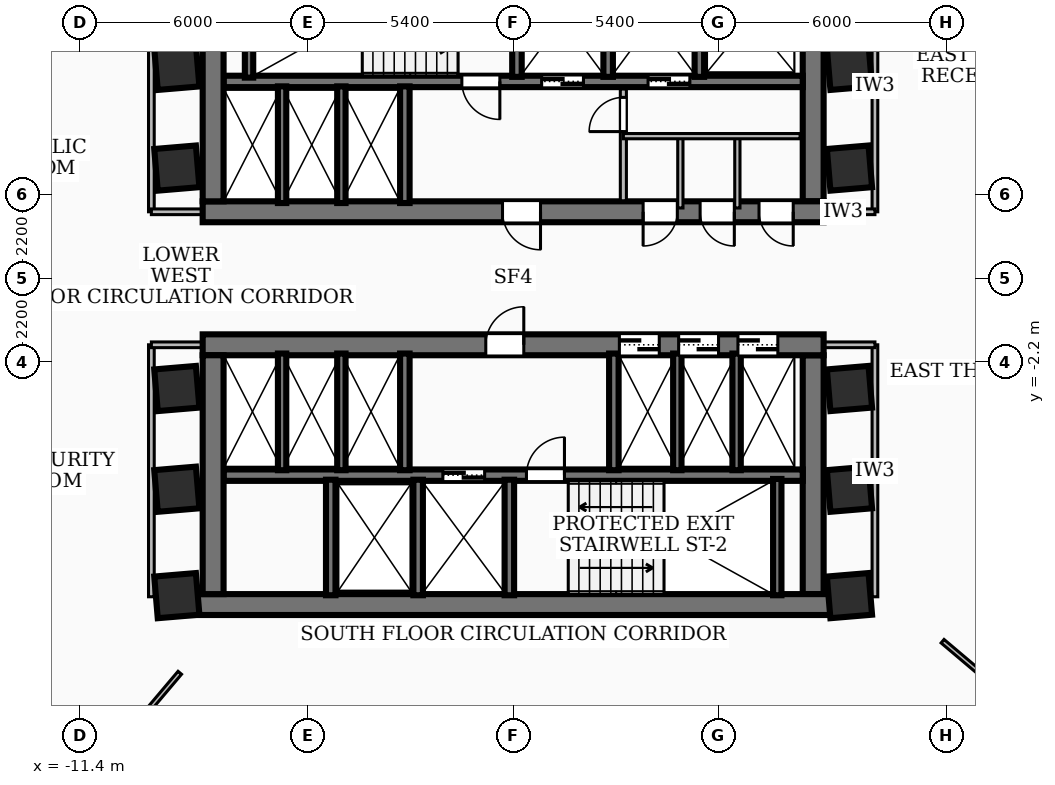
"""IFC4 building model, lengths in metres.
Left out: names, types, materials, properties, quantities, classifications, styles, units other than length and angle.
Written with IfcOpenShell. Run it as: python <this file> out.ifc"""

import sys

from ifc_helpers import new_model, si_unit, direction, frame, frame_2d, origin, origin_2d, place, context, subcontext, project, spatial, rectangle, extrude, element, fill, save


model = new_model("IFC4")
c1 = context("Model", 3, precision=1e-05, world=origin(), true_north=direction((0.0, 1.0)))
c2 = subcontext(c1, "Body", "Model", "MODEL_VIEW")
j1 = project(units=[si_unit("LENGTHUNIT", "METRE"), si_unit("PLANEANGLEUNIT", "RADIAN")], contexts=[c1])
p1 = place(None, origin())
s1 = spatial("IfcSite", under=j1, at=p1, CompositionType="ELEMENT")
p2 = place(p1, origin())
s2 = spatial("IfcBuilding", under=s1, at=p2, CompositionType="ELEMENT")
p3 = place(p2, frame((0.0, 0.0, 64.08)))
s3 = spatial("IfcBuildingStorey", under=s2, at=p3, CompositionType="ELEMENT", Elevation=64.08)
p4 = place(p3, frame((8.17, 1.75, 0.0), z_axis=(0.0, 0.0, 1.0), x_axis=(-1.0, 0.0, 0.0)))
e1 = element("IfcWall", 1, at=p4, inside=s3, PredefinedType="SHEAR", context=c2, shape_type="SweptSolid", body=[
    extrude(rectangle(XDim=16.34, YDim=0.55, at=frame_2d((8.17, 0.0))), origin(), (0.0, 0.0, 1.0), 3.34),
])
p5 = place(p4, frame((7.45, 0.0, 0.0)))
e2 = element("IfcOpeningElement", 2, at=p5, cuts=e1, PredefinedType="OPENING", context=c2, shape_type="SweptSolid", body=[
    extrude(rectangle(XDim=1.0, YDim=2.1, at=frame_2d((0.5, 1.05))), frame((0.0, 0.285, 0.0), z_axis=(0.0, -1.0, 0.0), x_axis=(1.0, 0.0, 0.0)), (0.0, 0.0, 1.0), 0.57),
])
p6 = place(p4, frame((3.85, 0.0, 0.0)))
e3 = element("IfcOpeningElement", 3, at=p6, cuts=e1, PredefinedType="OPENING", context=c2, shape_type="SweptSolid", body=[
    extrude(rectangle(XDim=0.9, YDim=2.06, at=frame_2d((0.45, 1.03))), frame((0.0, 0.285, 0.0), z_axis=(0.0, -1.0, 0.0), x_axis=(1.0, 0.0, 0.0)), (0.0, 0.0, 1.0), 0.57),
])
p7 = place(p4, frame((2.35, 0.0, 0.0)))
e4 = element("IfcOpeningElement", 4, at=p7, cuts=e1, PredefinedType="OPENING", context=c2, shape_type="SweptSolid", body=[
    extrude(rectangle(XDim=0.9, YDim=2.06, at=frame_2d((0.45, 1.03))), frame((0.0, 0.285, 0.0), z_axis=(0.0, -1.0, 0.0), x_axis=(1.0, 0.0, 0.0)), (0.0, 0.0, 1.0), 0.57),
])
p8 = place(p4, frame((0.8, 0.0, 0.0)))
e5 = element("IfcOpeningElement", 5, at=p8, cuts=e1, PredefinedType="OPENING", context=c2, shape_type="SweptSolid", body=[
    extrude(rectangle(XDim=0.9, YDim=2.06, at=frame_2d((0.45, 1.03))), frame((0.0, 0.285, 0.0), z_axis=(0.0, -1.0, 0.0), x_axis=(1.0, 0.0, 0.0)), (0.0, 0.0, 1.0), 0.57),
])
for number, where, z_axis, x_axis in (
    (6, (-7.895, 2.025, 0.0), (0.0, 0.0, 1.0), (0.0, 1.0, 0.0)),
    (7, (7.895, 8.31, 0.0), (0.0, 0.0, 1.0), (0.0, -1.0, 0.0)),
):
    element("IfcWall", number, at=place(p3, frame(where, z_axis=z_axis, x_axis=x_axis)), inside=s3, PredefinedType="SHEAR", context=c2, shape_type="SweptSolid", body=[
        extrude(rectangle(XDim=6.285, YDim=0.55, at=frame_2d((3.143, 0.0))), origin(), (0.0, 0.0, 1.0), 3.34),
    ])
p9 = place(p3, frame((7.62, 5.18, 0.0), z_axis=(0.0, 0.0, 1.0), x_axis=(-1.0, 0.0, 0.0)))
e8 = element("IfcWall", 8, at=p9, inside=s3, PredefinedType="SOLIDWALL", context=c2, shape_type="SweptSolid", body=[
    extrude(rectangle(XDim=15.24, YDim=0.3, at=frame_2d((7.62, 0.0))), origin(), (0.0, 0.0, 1.0), 3.34),
])
p10 = place(p9, frame((5.77, 0.0, 0.0)))
e9 = element("IfcOpeningElement", 9, at=p10, cuts=e8, PredefinedType="OPENING", context=c2, shape_type="SweptSolid", body=[
    extrude(rectangle(XDim=1.1, YDim=2.15, at=frame_2d((0.55, 1.075))), frame((0.0, 0.16, 0.0), z_axis=(0.0, -1.0, 0.0), x_axis=(1.0, 0.0, 0.0)), (0.0, 0.0, 1.0), 0.32),
])
p11 = place(p9, frame((2.97, 0.0, 0.0)))
e10 = element("IfcOpeningElement", 10, at=p11, cuts=e8, PredefinedType="OPENING", context=c2, shape_type="SweptSolid", body=[
    extrude(rectangle(XDim=1.1, YDim=2.15, at=frame_2d((0.55, 1.075))), frame((0.0, 0.16, 0.0), z_axis=(0.0, -1.0, 0.0), x_axis=(1.0, 0.0, 0.0)), (0.0, 0.0, 1.0), 0.32),
])
p12 = place(p9, frame((7.97, 0.0, 0.0)))
e11 = element("IfcOpeningElement", 11, at=p12, cuts=e8, PredefinedType="OPENING", context=c2, shape_type="SweptSolid", body=[
    extrude(rectangle(XDim=1.0, YDim=2.1, at=frame_2d((0.5, 1.05))), frame((0.0, 0.16, 0.0), z_axis=(0.0, -1.0, 0.0), x_axis=(1.0, 0.0, 0.0)), (0.0, 0.0, 1.0), 0.32),
])
p13 = place(p3, frame((8.78, -8.585, 0.0), z_axis=(0.0, 0.0, 1.0), x_axis=(-1.0, 0.0, 0.0)))
e12 = element("IfcWall", 12, at=p13, inside=s3, PredefinedType="SHEAR", context=c2, shape_type="SweptSolid", body=[
    extrude(rectangle(XDim=17.56, YDim=0.55, at=frame_2d((8.78, 0.0))), origin(), (0.0, 0.0, 1.0), 3.34),
])
p14 = place(p3, frame((-8.17, -1.75, 0.0), z_axis=(0.0, 0.0, 1.0), x_axis=(1.0, 0.0, 0.0)))
e13 = element("IfcWall", 13, at=p14, inside=s3, PredefinedType="SHEAR", context=c2, shape_type="SweptSolid", body=[
    extrude(rectangle(XDim=16.34, YDim=0.55, at=frame_2d((8.17, 0.0))), origin(), (0.0, 0.0, 1.0), 3.34),
])
p15 = place(p14, frame((7.45, 0.0, 0.0)))
e14 = element("IfcOpeningElement", 14, at=p15, cuts=e13, PredefinedType="OPENING", context=c2, shape_type="SweptSolid", body=[
    extrude(rectangle(XDim=1.0, YDim=2.1, at=frame_2d((0.5, 1.05))), frame((0.0, 0.285, 0.0), z_axis=(0.0, -1.0, 0.0), x_axis=(1.0, 0.0, 0.0)), (0.0, 0.0, 1.0), 0.57),
])
p16 = place(p14, frame((10.965, 0.0, 0.0)))
e15 = element("IfcOpeningElement", 15, at=p16, cuts=e13, PredefinedType="OPENING", context=c2, shape_type="SweptSolid", body=[
    extrude(rectangle(XDim=1.05, YDim=2.15, at=frame_2d((0.525, 1.075))), frame((0.0, 0.285, 0.0), z_axis=(0.0, -1.0, 0.0), x_axis=(1.0, 0.0, 0.0)), (0.0, 0.0, 1.0), 0.57),
])
p17 = place(p14, frame((12.525, 0.0, 0.0)))
e16 = element("IfcOpeningElement", 16, at=p17, cuts=e13, PredefinedType="OPENING", context=c2, shape_type="SweptSolid", body=[
    extrude(rectangle(XDim=1.05, YDim=2.15, at=frame_2d((0.525, 1.075))), frame((0.0, 0.285, 0.0), z_axis=(0.0, -1.0, 0.0), x_axis=(1.0, 0.0, 0.0)), (0.0, 0.0, 1.0), 0.57),
])
p18 = place(p14, frame((14.085, 0.0, 0.0)))
e17 = element("IfcOpeningElement", 17, at=p18, cuts=e13, PredefinedType="OPENING", context=c2, shape_type="SweptSolid", body=[
    extrude(rectangle(XDim=1.05, YDim=2.15, at=frame_2d((0.525, 1.075))), frame((0.0, 0.285, 0.0), z_axis=(0.0, -1.0, 0.0), x_axis=(1.0, 0.0, 0.0)), (0.0, 0.0, 1.0), 0.57),
])
for number, where, z_axis, x_axis in (
    (18, (-7.895, -8.31, 0.0), (0.0, 0.0, 1.0), (0.0, 1.0, 0.0)),
    (19, (7.895, -2.025, 0.0), (0.0, 0.0, 1.0), (0.0, -1.0, 0.0)),
):
    element("IfcWall", number, at=place(p3, frame(where, z_axis=z_axis, x_axis=x_axis)), inside=s3, PredefinedType="SHEAR", context=c2, shape_type="SweptSolid", body=[
        extrude(rectangle(XDim=6.285, YDim=0.55, at=frame_2d((3.143, 0.0))), origin(), (0.0, 0.0, 1.0), 3.34),
    ])
p19 = place(p3, frame((-7.62, -5.18, 0.0), z_axis=(0.0, 0.0, 1.0), x_axis=(1.0, 0.0, 0.0)))
e20 = element("IfcWall", 20, at=p19, inside=s3, PredefinedType="SOLIDWALL", context=c2, shape_type="SweptSolid", body=[
    extrude(rectangle(XDim=15.24, YDim=0.3, at=frame_2d((7.62, 0.0))), origin(), (0.0, 0.0, 1.0), 3.34),
])
p20 = place(p19, frame((5.77, 0.0, 0.0)))
e21 = element("IfcOpeningElement", 21, at=p20, cuts=e20, PredefinedType="OPENING", context=c2, shape_type="SweptSolid", body=[
    extrude(rectangle(XDim=1.1, YDim=2.15, at=frame_2d((0.55, 1.075))), frame((0.0, 0.16, 0.0), z_axis=(0.0, -1.0, 0.0), x_axis=(1.0, 0.0, 0.0)), (0.0, 0.0, 1.0), 0.32),
])
p21 = place(p19, frame((7.97, 0.0, 0.0)))
e22 = element("IfcOpeningElement", 22, at=p21, cuts=e20, PredefinedType="OPENING", context=c2, shape_type="SweptSolid", body=[
    extrude(rectangle(XDim=1.0, YDim=2.1, at=frame_2d((0.5, 1.05))), frame((0.0, 0.16, 0.0), z_axis=(0.0, -1.0, 0.0), x_axis=(1.0, 0.0, 0.0)), (0.0, 0.0, 1.0), 0.32),
])
for number, where, z_axis, x_axis in (
    (23, (-6.95, 5.28, 0.0), (0.0, 0.0, 1.0), (0.0, 1.0, 0.0)),
    (24, (6.95, -8.34, 0.0), (0.0, 0.0, 1.0), (0.0, 1.0, 0.0)),
):
    element("IfcWall", number, at=place(p3, frame(where, z_axis=z_axis, x_axis=x_axis)), inside=s3, PredefinedType="SOLIDWALL", context=c2, shape_type="SweptSolid", body=[
        extrude(rectangle(XDim=3.06, YDim=0.22, at=frame_2d((1.53, 0.0))), origin(), (0.0, 0.0, 1.0), 3.34),
    ])
for number, where, z_axis, x_axis in (
    (25, (0.1, 5.3, 0.0), (0.0, 0.0, 1.0), (0.0, 1.0, 0.0)),
    (26, (2.5, 5.3, 0.0), (0.0, 0.0, 1.0), (0.0, 1.0, 0.0)),
    (27, (4.9, 5.3, 0.0), (0.0, 0.0, 1.0), (0.0, 1.0, 0.0)),
):
    element("IfcWall", number, at=place(p3, frame(where, z_axis=z_axis, x_axis=x_axis)), inside=s3, PredefinedType="SOLIDWALL", context=c2, shape_type="SweptSolid", body=[
        extrude(rectangle(XDim=3.04, YDim=0.25, at=frame_2d((1.52, 0.0))), origin(), (0.0, 0.0, 1.0), 3.34),
    ])
p22 = place(p3, frame((-2.85, 1.98, 0.0), z_axis=(0.0, 0.0, 1.0), x_axis=(0.0, 1.0, 0.0)))
e28 = element("IfcWall", 28, at=p22, inside=s3, PredefinedType="SOLIDWALL", context=c2, shape_type="SweptSolid", body=[
    extrude(rectangle(XDim=3.07, YDim=0.25, at=frame_2d((1.535, 0.0))), origin(), (0.0, 0.0, 1.0), 3.34),
])
for number, where, z_axis, x_axis in (
    (29, (-0.1, -8.34, 0.0), (0.0, 0.0, 1.0), (0.0, 1.0, 0.0)),
    (30, (-2.5, -8.34, 0.0), (0.0, 0.0, 1.0), (0.0, 1.0, 0.0)),
    (31, (-4.8, -8.34, 0.0), (0.0, 0.0, 1.0), (0.0, 1.0, 0.0)),
):
    element("IfcWall", number, at=place(p3, frame(where, z_axis=z_axis, x_axis=x_axis)), inside=s3, PredefinedType="SOLIDWALL", context=c2, shape_type="SweptSolid", body=[
        extrude(rectangle(XDim=3.04, YDim=0.25, at=frame_2d((1.52, 0.0))), origin(), (0.0, 0.0, 1.0), 3.34),
    ])
for number, where, z_axis, x_axis in (
    (32, (-2.85, -5.05, 0.0), (0.0, 0.0, 1.0), (0.0, 1.0, 0.0)),
    (33, (2.65, -5.05, 0.0), (0.0, 0.0, 1.0), (0.0, 1.0, 0.0)),
):
    element("IfcWall", number, at=place(p3, frame(where, z_axis=z_axis, x_axis=x_axis)), inside=s3, PredefinedType="SOLIDWALL", context=c2, shape_type="SweptSolid", body=[
        extrude(rectangle(XDim=3.07, YDim=0.25, at=frame_2d((1.535, 0.0))), origin(), (0.0, 0.0, 1.0), 3.34),
    ])
for number, where, z_axis, x_axis in (
    (34, (-6.08, 1.98, 0.0), (0.0, 0.0, 1.0), (0.0, 1.0, 0.0)),
    (35, (-4.52, 1.98, 0.0), (0.0, 0.0, 1.0), (0.0, 1.0, 0.0)),
    (36, (4.32, -5.05, 0.0), (0.0, 0.0, 1.0), (0.0, 1.0, 0.0)),
    (37, (5.88, -5.05, 0.0), (0.0, 0.0, 1.0), (0.0, 1.0, 0.0)),
    (38, (-6.08, -5.05, 0.0), (0.0, 0.0, 1.0), (0.0, 1.0, 0.0)),
    (39, (-4.52, -5.05, 0.0), (0.0, 0.0, 1.0), (0.0, 1.0, 0.0)),
):
    element("IfcWall", number, at=place(p3, frame(where, z_axis=z_axis, x_axis=x_axis)), inside=s3, PredefinedType="SOLIDWALL", context=c2, shape_type="SweptSolid", body=[
        extrude(rectangle(XDim=3.07, YDim=0.22, at=frame_2d((1.535, 0.0))), origin(), (0.0, 0.0, 1.0), 3.34),
    ])
for number, where, z_axis, x_axis in (
    (40, (-8.85, -5.55, 0.0), (0.0, 0.0, 1.0), (0.996, 0.084, 0.0)),
    (41, (-8.85, -2.9, 0.0), (0.0, 0.0, 1.0), (0.996, 0.084, 0.0)),
    (42, (-8.85, 2.9, 0.0), (0.0, 0.0, 1.0), (0.996, 0.084, 0.0)),
    (43, (-8.85, 5.55, 0.0), (0.0, 0.0, 1.0), (0.996, 0.084, 0.0)),
    (44, (8.85, -5.55, 0.0), (0.0, 0.0, 1.0), (0.996, 0.084, 0.0)),
    (45, (8.85, -2.9, 0.0), (0.0, 0.0, 1.0), (0.996, 0.084, 0.0)),
    (46, (8.85, 2.9, 0.0), (0.0, 0.0, 1.0), (0.996, 0.084, 0.0)),
    (47, (8.85, 5.55, 0.0), (0.0, 0.0, 1.0), (0.996, 0.084, 0.0)),
    (48, (8.85, -8.35, 0.0), (0.0, 0.0, 1.0), (0.996, 0.084, 0.0)),
    (49, (-8.85, -8.35, 0.0), (0.0, 0.0, 1.0), (0.996, 0.084, 0.0)),
):
    element("IfcColumn", number, at=place(p3, frame(where, z_axis=z_axis, x_axis=x_axis)), inside=s3, PredefinedType="COLUMN", context=c2, shape_type="SweptSolid", body=[
        extrude(rectangle(XDim=1.1, YDim=1.1, at=origin_2d()), origin(), (0.0, 0.0, 1.0), 3.6),
    ])
p23 = place(p3, frame((2.9, 2.04, 0.0), z_axis=(0.0, 0.0, 1.0), x_axis=(0.0, 1.0, 0.0)))
e50 = element("IfcWall", 50, at=p23, inside=s3, PredefinedType="PARTITIONING", context=c2, shape_type="SweptSolid", body=[
    extrude(rectangle(XDim=2.94, YDim=0.16, at=frame_2d((1.47, 0.0))), origin(), (0.0, 0.0, 1.0), 2.405),
])
p24 = place(p23, frame((1.82, 0.0, 0.0)))
e51 = element("IfcOpeningElement", 51, at=p24, cuts=e50, PredefinedType="OPENING", context=c2, shape_type="SweptSolid", body=[
    extrude(rectangle(XDim=0.9, YDim=2.06, at=frame_2d((0.45, 1.03))), frame((0.0, 0.09, 0.0), z_axis=(0.0, -1.0, 0.0), x_axis=(1.0, 0.0, 0.0)), (0.0, 0.0, 1.0), 0.18),
])
p25 = place(p3, frame((2.9, 3.74, 0.0), z_axis=(0.0, 0.0, 1.0), x_axis=(1.0, 0.0, 0.0)))
e52 = element("IfcWall", 52, at=p25, inside=s3, PredefinedType="PARTITIONING", context=c2, shape_type="SweptSolid", body=[
    extrude(rectangle(XDim=4.65, YDim=0.138, at=frame_2d((2.325, 0.0))), origin(), (0.0, 0.0, 1.0), 3.34),
])
for number, where, z_axis, x_axis in (
    (53, (4.4, 1.85, 0.0), (0.0, 0.0, 1.0), (0.0, 1.0, 0.0)),
    (54, (5.9, 1.85, 0.0), (0.0, 0.0, 1.0), (0.0, 1.0, 0.0)),
):
    element("IfcWall", number, at=place(p3, frame(where, z_axis=z_axis, x_axis=x_axis)), inside=s3, PredefinedType="PARTITIONING", context=c2, shape_type="SweptSolid", body=[
        extrude(rectangle(XDim=1.89, YDim=0.138, at=frame_2d((0.945, 0.0))), origin(), (0.0, 0.0, 1.0), 2.405),
    ])
p26 = place(p3, frame((-9.52, 1.75, 0.0), z_axis=(0.0, 0.0, 1.0), x_axis=(0.0, 1.0, 0.0)))
e55 = element("IfcWall", 55, at=p26, inside=s3, PredefinedType="PARTITIONING", context=c2, shape_type="SweptSolid", body=[
    extrude(rectangle(XDim=6.63, YDim=0.15, at=frame_2d((3.315, 0.0))), origin(), (0.0, 0.0, 1.0), 2.152),
])
p27 = place(p3, frame((-7.85, 1.75, 0.0), z_axis=(0.0, 0.0, 1.0), x_axis=(-1.0, 0.0, 0.0)))
e56 = element("IfcWall", 56, at=p27, inside=s3, PredefinedType="PARTITIONING", context=c2, shape_type="SweptSolid", body=[
    extrude(rectangle(XDim=1.67, YDim=0.15, at=frame_2d((0.835, 0.0))), origin(), (0.0, 0.0, 1.0), 2.405),
])
p28 = place(p3, frame((-9.52, -8.38, 0.0), z_axis=(0.0, 0.0, 1.0), x_axis=(0.0, 1.0, 0.0)))
e57 = element("IfcWall", 57, at=p28, inside=s3, PredefinedType="PARTITIONING", context=c2, shape_type="SweptSolid", body=[
    extrude(rectangle(XDim=6.63, YDim=0.15, at=frame_2d((3.315, 0.0))), origin(), (0.0, 0.0, 1.0), 2.152),
])
p29 = place(p3, frame((-7.85, -1.75, 0.0), z_axis=(0.0, 0.0, 1.0), x_axis=(-1.0, 0.0, 0.0)))
e58 = element("IfcWall", 58, at=p29, inside=s3, PredefinedType="PARTITIONING", context=c2, shape_type="SweptSolid", body=[
    extrude(rectangle(XDim=1.67, YDim=0.15, at=frame_2d((0.835, 0.0))), origin(), (0.0, 0.0, 1.0), 2.405),
])
p30 = place(p3, frame((9.52, 1.75, 0.0), z_axis=(0.0, 0.0, 1.0), x_axis=(0.0, 1.0, 0.0)))
e59 = element("IfcWall", 59, at=p30, inside=s3, PredefinedType="PARTITIONING", context=c2, shape_type="SweptSolid", body=[
    extrude(rectangle(XDim=6.63, YDim=0.15, at=frame_2d((3.315, 0.0))), origin(), (0.0, 0.0, 1.0), 2.152),
])
p31 = place(p3, frame((7.85, 1.75, 0.0), z_axis=(0.0, 0.0, 1.0), x_axis=(1.0, 0.0, 0.0)))
e60 = element("IfcWall", 60, at=p31, inside=s3, PredefinedType="PARTITIONING", context=c2, shape_type="SweptSolid", body=[
    extrude(rectangle(XDim=1.67, YDim=0.15, at=frame_2d((0.835, 0.0))), origin(), (0.0, 0.0, 1.0), 2.405),
])
p32 = place(p3, frame((9.52, -8.38, 0.0), z_axis=(0.0, 0.0, 1.0), x_axis=(0.0, 1.0, 0.0)))
e61 = element("IfcWall", 61, at=p32, inside=s3, PredefinedType="PARTITIONING", context=c2, shape_type="SweptSolid", body=[
    extrude(rectangle(XDim=6.63, YDim=0.15, at=frame_2d((3.315, 0.0))), origin(), (0.0, 0.0, 1.0), 2.152),
])
p33 = place(p3, frame((7.85, -1.75, 0.0), z_axis=(0.0, 0.0, 1.0), x_axis=(1.0, 0.0, 0.0)))
e62 = element("IfcWall", 62, at=p33, inside=s3, PredefinedType="PARTITIONING", context=c2, shape_type="SweptSolid", body=[
    extrude(rectangle(XDim=1.67, YDim=0.15, at=frame_2d((0.835, 0.0))), origin(), (0.0, 0.0, 1.0), 2.405),
])
p34 = place(p3, frame((-8.772, -10.38, 0.0), z_axis=(0.0, 0.0, 1.0), x_axis=(-0.645424146464, -0.763824371935, 0.0)))
e63 = element("IfcWall", 63, at=p34, inside=s3, PredefinedType="PARTITIONING", context=c2, shape_type="SweptSolid", body=[
    extrude(rectangle(XDim=6.064, YDim=0.12, at=frame_2d((3.032, 0.0))), origin(), (0.0, 0.0, 1.0), 2.072),
])
p35 = place(p3, frame((11.3, -9.549, 0.0), z_axis=(0.0, 0.0, 1.0), x_axis=(0.763780578352, -0.645475970221, 0.0)))
e64 = element("IfcWall", 64, at=p35, inside=s3, PredefinedType="PARTITIONING", context=c2, shape_type="SweptSolid", body=[
    extrude(rectangle(XDim=4.86, YDim=0.12, at=frame_2d((2.43, 0.0))), origin(), (0.0, 0.0, 1.0), 3.34),
])
p36 = place(p5, origin())
e65 = element("IfcDoor", 65, at=p36, inside=s3, OperationType="SINGLE_SWING_LEFT", PredefinedType="DOOR", context=c2, shape_type="SweptSolid", body=[
    extrude(rectangle(XDim=1.0, YDim=2.1, at=frame_2d((0.5, 1.05))), frame((0.0, 0.025, 0.0), z_axis=(0.0, -1.0, 0.0), x_axis=(1.0, 0.0, 0.0)), (0.0, 0.0, 1.0), 0.05),
])
fill(e2, e65)
p37 = place(p15, origin())
e66 = element("IfcDoor", 66, at=p37, inside=s3, OperationType="SINGLE_SWING_RIGHT", PredefinedType="DOOR", context=c2, shape_type="SweptSolid", body=[
    extrude(rectangle(XDim=1.0, YDim=2.1, at=frame_2d((0.5, 1.05))), frame((0.0, 0.025, 0.0), z_axis=(0.0, -1.0, 0.0), x_axis=(1.0, 0.0, 0.0)), (0.0, 0.0, 1.0), 0.05),
])
fill(e14, e66)
p38 = place(p10, origin())
e67 = element("IfcDoor", 67, at=p38, inside=s3, OperationType="DOUBLE_DOOR_SLIDING", PredefinedType="DOOR", context=c2, shape_type="SweptSolid", body=[
    extrude(rectangle(XDim=1.1, YDim=2.15, at=frame_2d((0.55, 1.075))), frame((0.0, 0.025, 0.0), z_axis=(0.0, -1.0, 0.0), x_axis=(1.0, 0.0, 0.0)), (0.0, 0.0, 1.0), 0.05),
])
fill(e9, e67)
p39 = place(p11, origin())
e68 = element("IfcDoor", 68, at=p39, inside=s3, OperationType="DOUBLE_DOOR_SLIDING", PredefinedType="DOOR", context=c2, shape_type="SweptSolid", body=[
    extrude(rectangle(XDim=1.1, YDim=2.15, at=frame_2d((0.55, 1.075))), frame((0.0, 0.025, 0.0), z_axis=(0.0, -1.0, 0.0), x_axis=(1.0, 0.0, 0.0)), (0.0, 0.0, 1.0), 0.05),
])
fill(e10, e68)
p40 = place(p12, origin())
e69 = element("IfcDoor", 69, at=p40, inside=s3, OperationType="SINGLE_SWING_LEFT", PredefinedType="DOOR", context=c2, shape_type="SweptSolid", body=[
    extrude(rectangle(XDim=1.0, YDim=2.1, at=frame_2d((0.5, 1.05))), frame((0.0, 0.025, 0.0), z_axis=(0.0, -1.0, 0.0), x_axis=(1.0, 0.0, 0.0)), (0.0, 0.0, 1.0), 0.05),
])
fill(e11, e69)
p41 = place(p20, origin())
e70 = element("IfcDoor", 70, at=p41, inside=s3, OperationType="DOUBLE_DOOR_SLIDING", PredefinedType="DOOR", context=c2, shape_type="SweptSolid", body=[
    extrude(rectangle(XDim=1.1, YDim=2.15, at=frame_2d((0.55, 1.075))), frame((0.0, 0.025, 0.0), z_axis=(0.0, -1.0, 0.0), x_axis=(1.0, 0.0, 0.0)), (0.0, 0.0, 1.0), 0.05),
])
fill(e21, e70)
p42 = place(p21, origin())
e71 = element("IfcDoor", 71, at=p42, inside=s3, OperationType="SINGLE_SWING_RIGHT", PredefinedType="DOOR", context=c2, shape_type="SweptSolid", body=[
    extrude(rectangle(XDim=1.0, YDim=2.1, at=frame_2d((0.5, 1.05))), frame((0.0, 0.025, 0.0), z_axis=(0.0, -1.0, 0.0), x_axis=(1.0, 0.0, 0.0)), (0.0, 0.0, 1.0), 0.05),
])
fill(e22, e71)
p43 = place(p16, origin())
e72 = element("IfcDoor", 72, at=p43, inside=s3, OperationType="DOUBLE_DOOR_SLIDING", PredefinedType="DOOR", context=c2, shape_type="SweptSolid", body=[
    extrude(rectangle(XDim=1.05, YDim=2.15, at=frame_2d((0.525, 1.075))), frame((0.0, 0.025, 0.0), z_axis=(0.0, -1.0, 0.0), x_axis=(1.0, 0.0, 0.0)), (0.0, 0.0, 1.0), 0.05),
])
fill(e15, e72)
p44 = place(p17, origin())
e73 = element("IfcDoor", 73, at=p44, inside=s3, OperationType="DOUBLE_DOOR_SLIDING", PredefinedType="DOOR", context=c2, shape_type="SweptSolid", body=[
    extrude(rectangle(XDim=1.05, YDim=2.15, at=frame_2d((0.525, 1.075))), frame((0.0, 0.025, 0.0), z_axis=(0.0, -1.0, 0.0), x_axis=(1.0, 0.0, 0.0)), (0.0, 0.0, 1.0), 0.05),
])
fill(e16, e73)
p45 = place(p18, origin())
e74 = element("IfcDoor", 74, at=p45, inside=s3, OperationType="DOUBLE_DOOR_SLIDING", PredefinedType="DOOR", context=c2, shape_type="SweptSolid", body=[
    extrude(rectangle(XDim=1.05, YDim=2.15, at=frame_2d((0.525, 1.075))), frame((0.0, 0.025, 0.0), z_axis=(0.0, -1.0, 0.0), x_axis=(1.0, 0.0, 0.0)), (0.0, 0.0, 1.0), 0.05),
])
fill(e17, e74)
p46 = place(p6, origin())
e75 = element("IfcDoor", 75, at=p46, inside=s3, OperationType="SINGLE_SWING_RIGHT", PredefinedType="DOOR", context=c2, shape_type="SweptSolid", body=[
    extrude(rectangle(XDim=0.9, YDim=2.06, at=frame_2d((0.45, 1.03))), frame((0.0, 0.025, 0.0), z_axis=(0.0, -1.0, 0.0), x_axis=(1.0, 0.0, 0.0)), (0.0, 0.0, 1.0), 0.05),
])
fill(e3, e75)
p47 = place(p7, origin())
e76 = element("IfcDoor", 76, at=p47, inside=s3, OperationType="SINGLE_SWING_LEFT", PredefinedType="DOOR", context=c2, shape_type="SweptSolid", body=[
    extrude(rectangle(XDim=0.9, YDim=2.06, at=frame_2d((0.45, 1.03))), frame((0.0, 0.025, 0.0), z_axis=(0.0, -1.0, 0.0), x_axis=(1.0, 0.0, 0.0)), (0.0, 0.0, 1.0), 0.05),
])
fill(e4, e76)
p48 = place(p8, origin())
e77 = element("IfcDoor", 77, at=p48, inside=s3, OperationType="SINGLE_SWING_LEFT", PredefinedType="DOOR", context=c2, shape_type="SweptSolid", body=[
    extrude(rectangle(XDim=0.9, YDim=2.06, at=frame_2d((0.45, 1.03))), frame((0.0, 0.025, 0.0), z_axis=(0.0, -1.0, 0.0), x_axis=(1.0, 0.0, 0.0)), (0.0, 0.0, 1.0), 0.05),
])
fill(e5, e77)
p49 = place(p24, origin())
e78 = element("IfcDoor", 78, at=p49, inside=s3, OperationType="SINGLE_SWING_LEFT", PredefinedType="DOOR", context=c2, shape_type="SweptSolid", body=[
    extrude(rectangle(XDim=0.9, YDim=2.06, at=frame_2d((0.45, 1.03))), frame((0.0, 0.025, 0.0), z_axis=(0.0, -1.0, 0.0), x_axis=(1.0, 0.0, 0.0)), (0.0, 0.0, 1.0), 0.05),
])
fill(e51, e78)
save(model, sys.argv[1])
